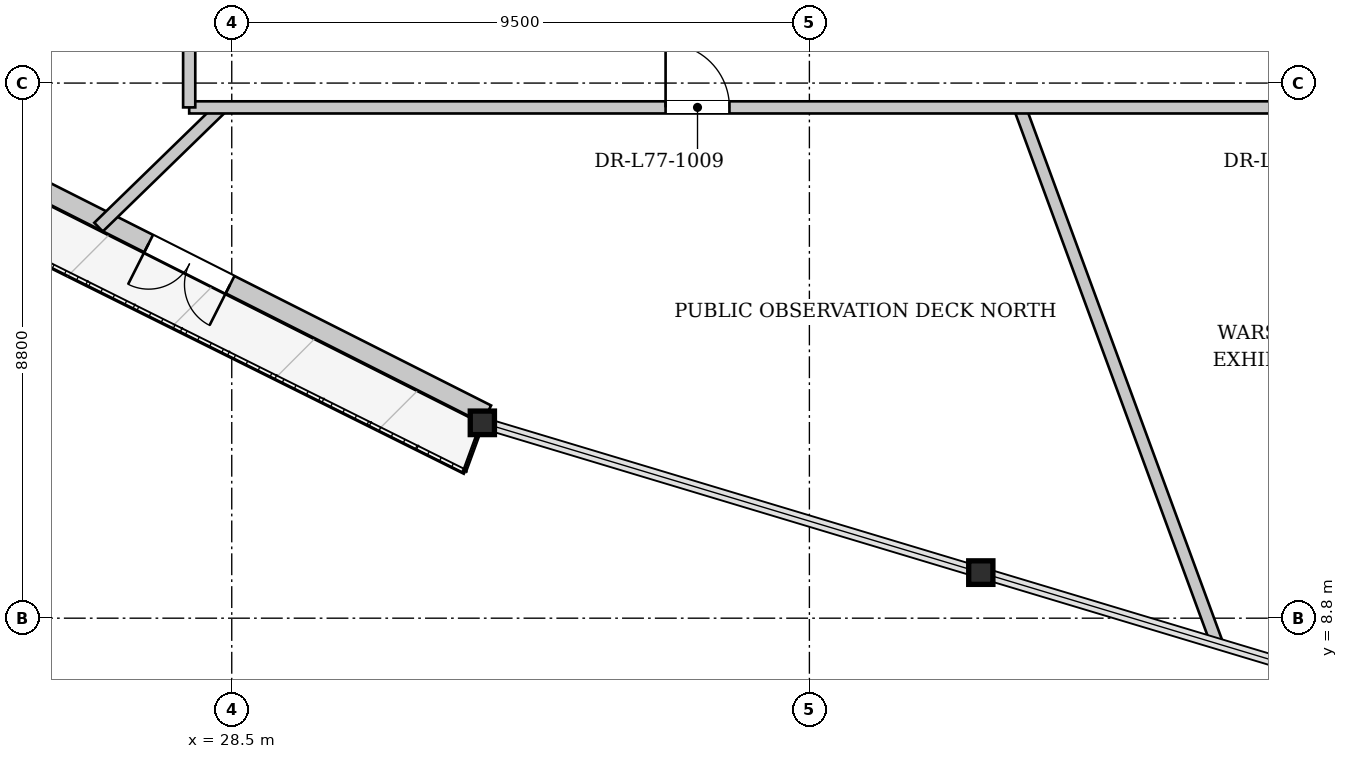
"""IFC4 building model, lengths in metres.
Left out: names, types, materials, properties, quantities, classifications, styles, units other than length and angle.
Written with IfcOpenShell. Run it as: python <this file> out.ifc"""

import sys

from ifc_helpers import new_model, si_unit, direction, frame, frame_2d, origin, origin_2d, place, context, subcontext, project, spatial, rectangle, i_section, extrude, source, transform, mapped, element, fill, save


model = new_model("IFC4")
c1 = context("Model", 3, precision=1e-05, world=origin(), true_north=direction((0.0, 1.0)))
c2 = subcontext(c1, "Body", "Model", "MODEL_VIEW")
j1 = project(units=[si_unit("LENGTHUNIT", "METRE"), si_unit("PLANEANGLEUNIT", "RADIAN")], contexts=[c1])
p1 = place(None, origin())
s1 = spatial("IfcSite", under=j1, at=p1, CompositionType="ELEMENT")
p2 = place(p1, origin())
s2 = spatial("IfcBuilding", under=s1, at=p2, CompositionType="ELEMENT")
p3 = place(p2, frame((0.0, 0.0, 290.5)))
s3 = spatial("IfcBuildingStorey", under=s2, at=p3, CompositionType="ELEMENT", Elevation=290.5)
m1 = source(origin(), c2, "Body", "SweptSolid", [
    extrude(i_section(OverallWidth=0.398, OverallDepth=0.387, WebThickness=0.019, FlangeThickness=0.029, at=origin_2d()), origin(), (0.0, 0.0, 1.0), 4.255),
])
for number, where, z_axis, x_axis in (
    (1, (32.621, 12.012, 0.0), (0.0, 0.0, 1.0), (1.0, 0.0, 0.0)),
    (2, (40.819, 9.55, 0.0), (0.0, 0.0, 1.0), (1.0, 0.0, 0.0)),
):
    element("IfcColumn", number, at=place(p3, frame(where, z_axis=z_axis, x_axis=x_axis)), inside=s3, PredefinedType="COLUMN", context=c2, shape_type="MappedRepresentation", body=[
        mapped(m1, transform((0.0, 0.0, 0.0), x_axis=(1.0, 0.0, 0.0), y_axis=(0.0, 1.0, 0.0), z_axis=(0.0, 0.0, 1.0), scale=1.0)),
    ])
p4 = place(p3, frame((32.694, 12.155, 0.0), z_axis=(0.0, 0.0, 1.0), x_axis=(-0.89278116215, 0.450490617561, 0.0)))
e3 = element("IfcWall", 3, at=p4, inside=s3, PredefinedType="SOLIDWALL", context=c2, shape_type="SweptSolid", body=[
    extrude(rectangle(XDim=17.119, YDim=0.32, at=frame_2d((8.56, 0.0))), origin(), (0.0, 0.0, 1.0), 3.782),
])
p5 = place(p4, frame((4.728, 0.0, 0.0)))
e4 = element("IfcOpeningElement", 4, at=p5, cuts=e3, PredefinedType="OPENING", context=c2, shape_type="SweptSolid", body=[
    extrude(rectangle(XDim=1.5, YDim=2.3, at=frame_2d((0.75, 1.15))), frame((0.0, 0.17, 0.0), z_axis=(0.0, -1.0, 0.0), x_axis=(1.0, 0.0, 0.0)), (0.0, 0.0, 1.0), 0.34),
])
p6 = place(p4, frame((11.368, 0.0, 0.65)))
e5 = element("IfcOpeningElement", 5, at=p6, cuts=e3, PredefinedType="OPENING", context=c2, shape_type="SweptSolid", body=[
    extrude(rectangle(XDim=2.6, YDim=2.35, at=frame_2d((1.3, 1.175))), frame((0.0, 0.17, 0.0), z_axis=(0.0, -1.0, 0.0), x_axis=(1.0, 0.0, 0.0)), (0.0, 0.0, 1.0), 0.34),
])
p7 = place(p3, frame((28.334, 17.2, 0.0), z_axis=(0.0, 0.0, 1.0), x_axis=(-0.716936105059, -0.697138882334, 0.0)))
e6 = element("IfcWall", 6, at=p7, inside=s3, PredefinedType="PARTITIONING", context=c2, shape_type="SweptSolid", body=[
    extrude(rectangle(XDim=2.824, YDim=0.2, at=frame_2d((1.412, 0.0))), origin(), (0.0, 0.0, 1.0), 4.24),
])
p8 = place(p3, frame((41.458, 17.2, 0.0), z_axis=(0.0, 0.0, 1.0), x_axis=(0.345312374887, -0.938487806927, 0.0)))
e7 = element("IfcWall", 7, at=p8, inside=s3, PredefinedType="PARTITIONING", context=c2, shape_type="SweptSolid", body=[
    extrude(rectangle(XDim=9.357, YDim=0.2, at=frame_2d((4.679, 0.0))), origin(), (0.0, 0.0, 1.0), 4.24),
])
p9 = place(p3, frame((27.8, 17.2, 0.0), z_axis=(0.0, 0.0, 1.0), x_axis=(1.0, 0.0, 0.0)))
e8 = element("IfcWall", 8, at=p9, inside=s3, PredefinedType="PARTITIONING", context=c2, shape_type="SweptSolid", body=[
    extrude(rectangle(XDim=20.4, YDim=0.2, at=frame_2d((10.2, 0.0))), origin(), (0.0, 0.0, 1.0), 3.865),
])
p10 = place(p9, frame((7.835, 0.0, 0.0)))
e9 = element("IfcOpeningElement", 9, at=p10, cuts=e8, PredefinedType="OPENING", context=c2, shape_type="SweptSolid", body=[
    extrude(rectangle(XDim=1.05, YDim=2.2, at=frame_2d((0.525, 1.1))), frame((0.0, 0.11, 0.0), z_axis=(0.0, -1.0, 0.0), x_axis=(1.0, 0.0, 0.0)), (0.0, 0.0, 1.0), 0.22),
])
p11 = place(p9, frame((18.182, 0.0, 0.0)))
e10 = element("IfcOpeningElement", 10, at=p11, cuts=e8, PredefinedType="OPENING", context=c2, shape_type="SweptSolid", body=[
    extrude(rectangle(XDim=1.05, YDim=2.2, at=frame_2d((0.525, 1.1))), frame((0.0, 0.11, 0.0), z_axis=(0.0, -1.0, 0.0), x_axis=(1.0, 0.0, 0.0)), (0.0, 0.0, 1.0), 0.22),
])
p12 = place(p3, frame((27.8, 17.2, 0.0), z_axis=(0.0, 0.0, 1.0), x_axis=(0.0, 1.0, 0.0)))
e11 = element("IfcWall", 11, at=p12, inside=s3, PredefinedType="PARTITIONING", context=c2, shape_type="SweptSolid", body=[
    extrude(rectangle(XDim=16.92, YDim=0.2, at=frame_2d((8.46, 0.0))), origin(), (0.0, 0.0, 1.0), 4.24),
])
p13 = place(p12, frame((8.114, 0.0, 0.0)))
e12 = element("IfcOpeningElement", 12, at=p13, cuts=e11, PredefinedType="OPENING", context=c2, shape_type="SweptSolid", body=[
    extrude(rectangle(XDim=1.6, YDim=2.2, at=frame_2d((0.8, 1.1))), frame((0.0, 0.11, 0.0), z_axis=(0.0, -1.0, 0.0), x_axis=(1.0, 0.0, 0.0)), (0.0, 0.0, 1.0), 0.22),
])
m2 = source(origin(), c2, "Body", "SweptSolid", [
    extrude(rectangle(XDim=1.5, YDim=2.3, at=frame_2d((0.75, 1.15))), frame((0.0, 0.025, 0.0), z_axis=(0.0, -1.0, 0.0), x_axis=(1.0, 0.0, 0.0)), (0.0, 0.0, 1.0), 0.05),
])
p14 = place(p5, origin())
e13 = element("IfcDoor", 13, at=p14, inside=s3, OperationType="DOUBLE_DOOR_SINGLE_SWING", PredefinedType="DOOR", context=c2, shape_type="MappedRepresentation", body=[
    mapped(m2, transform((0.0, 0.0, 0.0), x_axis=(1.0, 0.0, 0.0), y_axis=(0.0, 1.0, 0.0), z_axis=(0.0, 0.0, 1.0), scale=1.0)),
])
fill(e4, e13)
m3 = source(origin(), c2, "Body", "SweptSolid", [
    extrude(rectangle(XDim=1.05, YDim=2.2, at=frame_2d((0.525, 1.1))), frame((0.0, 0.025, 0.0), z_axis=(0.0, -1.0, 0.0), x_axis=(1.0, 0.0, 0.0)), (0.0, 0.0, 1.0), 0.05),
])
p15 = place(p10, origin())
e14 = element("IfcDoor", 14, at=p15, inside=s3, OperationType="SINGLE_SWING_LEFT", PredefinedType="DOOR", context=c2, shape_type="MappedRepresentation", body=[
    mapped(m3, transform((0.0, 0.0, 0.0), x_axis=(1.0, 0.0, 0.0), y_axis=(0.0, 1.0, 0.0), z_axis=(0.0, 0.0, 1.0), scale=1.0)),
])
fill(e9, e14)
save(model, sys.argv[1])
